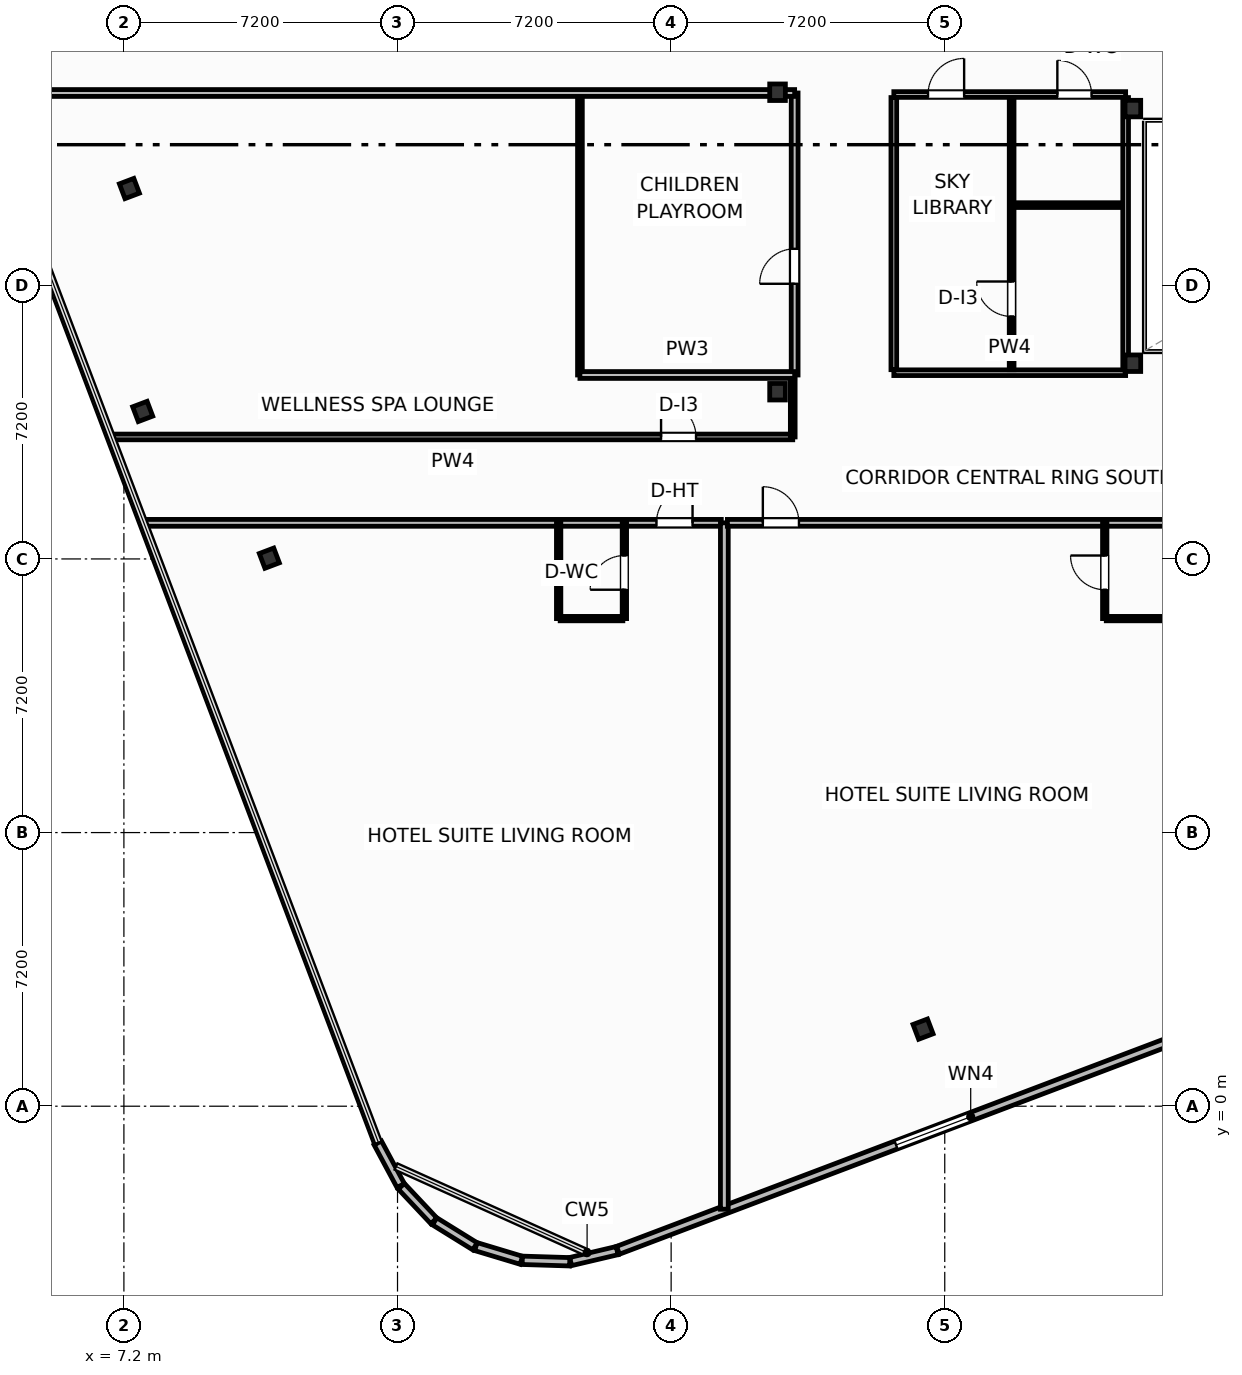
"""IFC4 building model, lengths in metres.
Left out: names, types, materials, properties, quantities, classifications, styles, units other than length and angle.
Written with IfcOpenShell. Run it as: python <this file> out.ifc"""

import sys

from ifc_helpers import new_model, si_unit, direction, frame, frame_2d, origin, origin_2d, place, context, subcontext, project, spatial, rectangle, i_section, extrude, element, fill, save


model = new_model("IFC4")
c1 = context("Model", 3, precision=1e-05, world=origin(), true_north=direction((0.0, 1.0)))
c2 = subcontext(c1, "Body", "Model", "MODEL_VIEW")
j1 = project(units=[si_unit("LENGTHUNIT", "METRE"), si_unit("PLANEANGLEUNIT", "RADIAN")], contexts=[c1])
p1 = place(None, origin())
s1 = spatial("IfcSite", under=j1, at=p1, CompositionType="ELEMENT")
p2 = place(p1, origin())
s2 = spatial("IfcBuilding", under=s1, at=p2, CompositionType="ELEMENT")
p3 = place(p2, frame((0.0, 0.0, 227.5)))
s3 = spatial("IfcBuildingStorey", under=s2, at=p3, CompositionType="ELEMENT", Elevation=227.5)
for number, where, z_axis, x_axis in (
    (1, (33.75, 19.55, 0.0), (0.0, 0.0, 1.0), (1.0, 0.0, 0.0)),
    (2, (33.75, 26.25, 0.0), (0.0, 0.0, 1.0), (1.0, 0.0, 0.0)),
    (3, (24.4, 18.8, 0.0), (0.0, 0.0, 1.0), (1.0, 0.0, 0.0)),
    (4, (24.4, 26.68, 0.0), (0.0, 0.0, 1.0), (1.0, 0.0, 0.0)),
):
    element("IfcColumn", number, at=place(p3, frame(where, z_axis=z_axis, x_axis=x_axis)), inside=s3, PredefinedType="COLUMN", context=c2, shape_type="SweptSolid", body=[
        extrude(i_section(OverallWidth=0.412, OverallDepth=0.435, WebThickness=0.036, FlangeThickness=0.057, FilletRadius=0.025, at=origin_2d()), origin(), (0.0, 0.0, 1.0), 3.7),
    ])
for number, where, z_axis, x_axis in (
    (5, (28.229, 2.028, 0.0), (0.0, 0.0, 1.0), (0.935, 0.354, 0.0)),
    (6, (7.345, 24.146, 0.0), (0.0, 0.0, 1.0), (0.935, 0.354, 0.0)),
    (7, (7.695, 18.281, 0.0), (0.0, 0.0, 1.0), (0.935, 0.354, 0.0)),
    (8, (11.027, 14.42, 0.0), (0.0, 0.0, 1.0), (0.935, 0.354, 0.0)),
):
    element("IfcColumn", number, at=place(p3, frame(where, z_axis=z_axis, x_axis=x_axis)), inside=s3, PredefinedType="COLUMN", context=c2, shape_type="SweptSolid", body=[
        extrude(i_section(OverallWidth=0.406, OverallDepth=0.416, WebThickness=0.03, FlangeThickness=0.048, FilletRadius=0.025, at=origin_2d()), origin(), (0.0, 0.0, 1.0), 3.7),
    ])
p4 = place(p3, frame((13.881, -0.966, 0.0), z_axis=(0.0, 0.0, 1.0), x_axis=(0.473242342135, -0.88093228208, 0.0)))
e9 = element("IfcWall", 9, at=p4, inside=s3, PredefinedType="SOLIDWALL", context=c2, shape_type="SweptSolid", body=[
    extrude(rectangle(XDim=1.274, YDim=0.22, at=frame_2d((0.637, 0.0))), origin(), (0.0, 0.0, 1.0), 2.73),
])
for number, where, z_axis, x_axis in (
    (10, (14.5, -2.106, 0.0), (0.0, 0.0, 1.0), (0.685, -0.729, 0.0)),
    (11, (15.377, -3.029, 0.0), (0.0, 0.0, 1.0), (0.85, -0.526, 0.0)),
    (12, (16.463, -3.694, 0.0), (0.0, 0.0, 1.0), (0.958, -0.288, 0.0)),
):
    element("IfcWall", number, at=place(p3, frame(where, z_axis=z_axis, x_axis=x_axis)), inside=s3, PredefinedType="SOLIDWALL", context=c2, shape_type="SweptSolid", body=[
        extrude(rectangle(XDim=1.249, YDim=0.22, at=frame_2d((0.624, 0.0))), origin(), (0.0, 0.0, 1.0), 2.73),
    ])
p5 = place(p3, frame((17.683, -4.055, 0.0), z_axis=(0.0, 0.0, 1.0), x_axis=(0.999522886512, -0.030886879732, 0.0)))
e13 = element("IfcWall", 13, at=p5, inside=s3, PredefinedType="SOLIDWALL", context=c2, shape_type="SweptSolid", body=[
    extrude(rectangle(XDim=1.249, YDim=0.22, at=frame_2d((0.625, 0.0))), origin(), (0.0, 0.0, 1.0), 2.73),
])
p6 = place(p3, frame((18.956, -4.087, 0.0), z_axis=(0.0, 0.0, 1.0), x_axis=(0.973463008152, 0.228844426981, 0.0)))
e14 = element("IfcWall", 14, at=p6, inside=s3, PredefinedType="SOLIDWALL", context=c2, shape_type="SweptSolid", body=[
    extrude(rectangle(XDim=1.257, YDim=0.22, at=frame_2d((0.628, 0.0))), origin(), (0.0, 0.0, 1.0), 2.73),
])
p7 = place(p3, frame((20.202, -3.791, 0.0), z_axis=(0.0, 0.0, 1.0), x_axis=(0.935225574232, 0.354052432984, 0.0)))
e15 = element("IfcWall", 15, at=p7, inside=s3, PredefinedType="SOLIDWALL", context=c2, shape_type="SweptSolid", body=[
    extrude(rectangle(XDim=17.747, YDim=0.22, at=frame_2d((8.874, 0.0))), origin(), (0.0, 0.0, 1.0), 2.73),
])
p8 = place(p7, frame((7.823, 0.0, 0.8)))
e16 = element("IfcOpeningElement", 16, at=p8, cuts=e15, PredefinedType="OPENING", context=c2, shape_type="SweptSolid", body=[
    extrude(rectangle(XDim=2.1, YDim=1.75, at=frame_2d((1.05, 0.875))), frame((0.0, 0.12, 0.0), z_axis=(0.0, -1.0, 0.0), x_axis=(1.0, 0.0, 0.0)), (0.0, 0.0, 1.0), 0.24),
])
p9 = place(p3, frame((6.908, 17.61, 0.0), z_axis=(0.0, 0.0, 1.0), x_axis=(1.0, 0.0, 0.0)))
e17 = element("IfcWall", 17, at=p9, inside=s3, PredefinedType="PARTITIONING", context=c2, shape_type="SweptSolid", body=[
    extrude(rectangle(XDim=17.892, YDim=0.15, at=frame_2d((8.946, 0.0))), origin(), (0.0, 0.0, 1.0), 3.45),
])
p10 = place(p9, frame((14.427, 0.0, 0.0)))
e18 = element("IfcOpeningElement", 18, at=p10, cuts=e17, PredefinedType="OPENING", context=c2, shape_type="SweptSolid", body=[
    extrude(rectangle(XDim=0.92, YDim=2.05, at=frame_2d((0.46, 1.025))), frame((0.0, 0.085, 0.0), z_axis=(0.0, -1.0, 0.0), x_axis=(1.0, 0.0, 0.0)), (0.0, 0.0, 1.0), 0.17),
])
p11 = place(p3, frame((24.8, 17.61, 0.0), z_axis=(0.0, 0.0, 1.0), x_axis=(0.0, 1.0, 0.0)))
e19 = element("IfcWall", 19, at=p11, inside=s3, PredefinedType="PARTITIONING", context=c2, shape_type="SweptSolid", body=[
    extrude(rectangle(XDim=1.63, YDim=0.125, at=frame_2d((0.815, 0.0))), origin(), (0.0, 0.0, 1.0), 2.739),
])
p12 = place(p3, frame((7.764, 15.35, 0.0), z_axis=(0.0, 0.0, 1.0), x_axis=(1.0, 0.0, 0.0)))
e20 = element("IfcWall", 20, at=p12, inside=s3, PredefinedType="PARTITIONING", context=c2, shape_type="SweptSolid", body=[
    extrude(rectangle(XDim=15.156, YDim=0.18, at=frame_2d((7.578, 0.0))), origin(), (0.0, 0.0, 1.0), 3.45),
])
p13 = place(p12, frame((13.45, 0.0, 0.0)))
e21 = element("IfcOpeningElement", 21, at=p13, cuts=e20, PredefinedType="OPENING", context=c2, shape_type="SweptSolid", body=[
    extrude(rectangle(XDim=0.95, YDim=2.15, at=frame_2d((0.475, 1.075))), frame((0.0, 0.1, 0.0), z_axis=(0.0, -1.0, 0.0), x_axis=(1.0, 0.0, 0.0)), (0.0, 0.0, 1.0), 0.2),
])
p14 = place(p3, frame((18.68, 12.83, 0.0), z_axis=(0.0, 0.0, 1.0), x_axis=(1.0, 0.0, 0.0)))
e22 = element("IfcWall", 22, at=p14, inside=s3, PredefinedType="PARTITIONING", context=c2, shape_type="SweptSolid", body=[
    extrude(rectangle(XDim=1.65, YDim=0.115, at=frame_2d((0.825, 0.0))), origin(), (0.0, 0.0, 1.0), 3.45),
])
p15 = place(p3, frame((20.37, 12.83, 0.0), z_axis=(0.0, 0.0, 1.0), x_axis=(0.0, 1.0, 0.0)))
e23 = element("IfcWall", 23, at=p15, inside=s3, PredefinedType="PARTITIONING", context=c2, shape_type="SweptSolid", body=[
    extrude(rectangle(XDim=2.52, YDim=0.115, at=frame_2d((1.26, 0.0))), origin(), (0.0, 0.0, 1.0), 3.45),
])
p16 = place(p15, frame((0.76, 0.0, 0.0)))
e24 = element("IfcOpeningElement", 24, at=p16, cuts=e23, PredefinedType="OPENING", context=c2, shape_type="SweptSolid", body=[
    extrude(rectangle(XDim=0.9, YDim=2.05, at=frame_2d((0.45, 1.025))), frame((0.0, 0.067, 0.0), z_axis=(0.0, -1.0, 0.0), x_axis=(1.0, 0.0, 0.0)), (0.0, 0.0, 1.0), 0.135),
])
p17 = place(p3, frame((18.64, 12.83, 0.0), z_axis=(0.0, 0.0, 1.0), x_axis=(0.0, 1.0, 0.0)))
e25 = element("IfcWall", 25, at=p17, inside=s3, PredefinedType="PARTITIONING", context=c2, shape_type="SweptSolid", body=[
    extrude(rectangle(XDim=2.52, YDim=0.115, at=frame_2d((1.26, 0.0))), origin(), (0.0, 0.0, 1.0), 3.45),
])
p18 = place(p3, frame((23.0, -2.71, 0.0), z_axis=(0.0, 0.0, 1.0), x_axis=(0.0, 1.0, 0.0)))
e26 = element("IfcWall", 26, at=p18, inside=s3, PredefinedType="PARTITIONING", context=c2, shape_type="SweptSolid", body=[
    extrude(rectangle(XDim=18.06, YDim=0.205, at=frame_2d((9.03, 0.0))), origin(), (0.0, 0.0, 1.0), 3.45),
])
p19 = place(p3, frame((23.08, 15.35, 0.0), z_axis=(0.0, 0.0, 1.0), x_axis=(1.0, 0.0, 0.0)))
e27 = element("IfcWall", 27, at=p19, inside=s3, PredefinedType="PARTITIONING", context=c2, shape_type="SweptSolid", body=[
    extrude(rectangle(XDim=12.34, YDim=0.18, at=frame_2d((6.17, 0.0))), origin(), (0.0, 0.0, 1.0), 3.45),
])
p20 = place(p19, frame((0.933, 0.0, 0.0)))
e28 = element("IfcOpeningElement", 28, at=p20, cuts=e27, PredefinedType="OPENING", context=c2, shape_type="SweptSolid", body=[
    extrude(rectangle(XDim=0.95, YDim=2.15, at=frame_2d((0.475, 1.075))), frame((0.0, 0.1, 0.0), z_axis=(0.0, -1.0, 0.0), x_axis=(1.0, 0.0, 0.0)), (0.0, 0.0, 1.0), 0.2),
])
p21 = place(p3, frame((33.05, 12.83, 0.0), z_axis=(0.0, 0.0, 1.0), x_axis=(1.0, 0.0, 0.0)))
e29 = element("IfcWall", 29, at=p21, inside=s3, PredefinedType="PARTITIONING", context=c2, shape_type="SweptSolid", body=[
    extrude(rectangle(XDim=2.15, YDim=0.115, at=frame_2d((1.075, 0.0))), origin(), (0.0, 0.0, 1.0), 3.45),
])
p22 = place(p3, frame((33.01, 12.83, 0.0), z_axis=(0.0, 0.0, 1.0), x_axis=(0.0, 1.0, 0.0)))
e30 = element("IfcWall", 30, at=p22, inside=s3, PredefinedType="PARTITIONING", context=c2, shape_type="SweptSolid", body=[
    extrude(rectangle(XDim=2.52, YDim=0.115, at=frame_2d((1.26, 0.0))), origin(), (0.0, 0.0, 1.0), 3.45),
])
p23 = place(p22, frame((0.76, 0.0, 0.0)))
e31 = element("IfcOpeningElement", 31, at=p23, cuts=e30, PredefinedType="OPENING", context=c2, shape_type="SweptSolid", body=[
    extrude(rectangle(XDim=0.9, YDim=2.05, at=frame_2d((0.45, 1.025))), frame((0.0, 0.067, 0.0), z_axis=(0.0, -1.0, 0.0), x_axis=(1.0, 0.0, 0.0)), (0.0, 0.0, 1.0), 0.135),
])
p24 = place(p3, frame((24.85, 19.24, 0.0), z_axis=(0.0, 0.0, 1.0), x_axis=(0.0, 1.0, 0.0)))
e32 = element("IfcWall", 32, at=p24, inside=s3, PredefinedType="PARTITIONING", context=c2, shape_type="SweptSolid", body=[
    extrude(rectangle(XDim=7.42, YDim=0.18, at=frame_2d((3.71, 0.0))), origin(), (0.0, 0.0, 1.0), 3.45),
])
p25 = place(p24, frame((2.4, 0.0, 0.0)))
e33 = element("IfcOpeningElement", 33, at=p25, cuts=e32, PredefinedType="OPENING", context=c2, shape_type="SweptSolid", body=[
    extrude(rectangle(XDim=0.92, YDim=2.05, at=frame_2d((0.46, 1.025))), frame((0.0, 0.1, 0.0), z_axis=(0.0, -1.0, 0.0), x_axis=(1.0, 0.0, 0.0)), (0.0, 0.0, 1.0), 0.2),
])
p26 = place(p3, frame((19.2, 19.24, 0.0), z_axis=(0.0, 0.0, 1.0), x_axis=(0.0, 1.0, 0.0)))
e34 = element("IfcWall", 34, at=p26, inside=s3, PredefinedType="PARTITIONING", context=c2, shape_type="SweptSolid", body=[
    extrude(rectangle(XDim=7.42, YDim=0.125, at=frame_2d((3.71, 0.0))), origin(), (0.0, 0.0, 1.0), 3.45),
])
p27 = place(p3, frame((19.2, 19.24, 0.0), z_axis=(0.0, 0.0, 1.0), x_axis=(1.0, 0.0, 0.0)))
e35 = element("IfcWall", 35, at=p27, inside=s3, PredefinedType="PARTITIONING", context=c2, shape_type="SweptSolid", body=[
    extrude(rectangle(XDim=5.65, YDim=0.18, at=frame_2d((2.825, 0.0))), origin(), (0.0, 0.0, 1.0), 3.45),
])
p28 = place(p3, frame((3.482, 26.66, 0.0), z_axis=(0.0, 0.0, 1.0), x_axis=(1.0, 0.0, 0.0)))
e36 = element("IfcWall", 36, at=p28, inside=s3, PredefinedType="PARTITIONING", context=c2, shape_type="SweptSolid", body=[
    extrude(rectangle(XDim=21.368, YDim=0.18, at=frame_2d((10.684, 0.0))), origin(), (0.0, 0.0, 1.0), 2.662),
])
p29 = place(p3, frame((27.46, 26.62, 0.0), z_axis=(0.0, 0.0, 1.0), x_axis=(1.0, 0.0, 0.0)))
e37 = element("IfcWall", 37, at=p29, inside=s3, PredefinedType="PARTITIONING", context=c2, shape_type="SweptSolid", body=[
    extrude(rectangle(XDim=6.1, YDim=0.15, at=frame_2d((3.05, 0.0))), origin(), (0.0, 0.0, 1.0), 2.662),
])
p30 = place(p29, frame((0.9, 0.0, 0.0)))
e38 = element("IfcOpeningElement", 38, at=p30, cuts=e37, PredefinedType="OPENING", context=c2, shape_type="SweptSolid", body=[
    extrude(rectangle(XDim=0.95, YDim=2.05, at=frame_2d((0.475, 1.025))), frame((0.0, 0.085, 0.0), z_axis=(0.0, -1.0, 0.0), x_axis=(1.0, 0.0, 0.0)), (0.0, 0.0, 1.0), 0.17),
])
p31 = place(p29, frame((4.303, 0.0, 0.0)))
e39 = element("IfcOpeningElement", 39, at=p31, cuts=e37, PredefinedType="OPENING", context=c2, shape_type="SweptSolid", body=[
    extrude(rectangle(XDim=0.9, YDim=2.05, at=frame_2d((0.45, 1.025))), frame((0.0, 0.085, 0.0), z_axis=(0.0, -1.0, 0.0), x_axis=(1.0, 0.0, 0.0)), (0.0, 0.0, 1.0), 0.17),
])
p32 = place(p3, frame((27.46, 19.3, 0.0), z_axis=(0.0, 0.0, 1.0), x_axis=(1.0, 0.0, 0.0)))
e40 = element("IfcWall", 40, at=p32, inside=s3, PredefinedType="PARTITIONING", context=c2, shape_type="SweptSolid", body=[
    extrude(rectangle(XDim=6.1, YDim=0.15, at=frame_2d((3.05, 0.0))), origin(), (0.0, 0.0, 1.0), 2.662),
])
p33 = place(p3, frame((30.56, 19.38, 0.0), z_axis=(0.0, 0.0, 1.0), x_axis=(0.0, 1.0, 0.0)))
e41 = element("IfcWall", 41, at=p33, inside=s3, PredefinedType="PARTITIONING", context=c2, shape_type="SweptSolid", body=[
    extrude(rectangle(XDim=7.16, YDim=0.125, at=frame_2d((3.58, 0.0))), origin(), (0.0, 0.0, 1.0), 3.45),
])
p34 = place(p33, frame((1.4, 0.0, 0.0)))
e42 = element("IfcOpeningElement", 42, at=p34, cuts=e41, PredefinedType="OPENING", context=c2, shape_type="SweptSolid", body=[
    extrude(rectangle(XDim=0.92, YDim=2.05, at=frame_2d((0.46, 1.025))), frame((0.0, 0.073, 0.0), z_axis=(0.0, -1.0, 0.0), x_axis=(1.0, 0.0, 0.0)), (0.0, 0.0, 1.0), 0.145),
])
p35 = place(p3, frame((30.64, 23.71, 0.0), z_axis=(0.0, 0.0, 1.0), x_axis=(1.0, 0.0, 0.0)))
e43 = element("IfcWall", 43, at=p35, inside=s3, PredefinedType="PARTITIONING", context=c2, shape_type="SweptSolid", body=[
    extrude(rectangle(XDim=2.88, YDim=0.125, at=frame_2d((1.44, 0.0))), origin(), (0.0, 0.0, 1.0), 3.45),
])
p36 = place(p3, frame((27.46, 19.38, 0.0), z_axis=(0.0, 0.0, 1.0), x_axis=(0.0, 1.0, 0.0)))
e44 = element("IfcWall", 44, at=p36, inside=s3, PredefinedType="PARTITIONING", context=c2, shape_type="SweptSolid", body=[
    extrude(rectangle(XDim=7.16, YDim=0.15, at=frame_2d((3.58, 0.0))), origin(), (0.0, 0.0, 1.0), 3.45),
])
p37 = place(p3, frame((33.56, 19.38, 0.0), z_axis=(0.0, 0.0, 1.0), x_axis=(0.0, 1.0, 0.0)))
e45 = element("IfcWall", 45, at=p37, inside=s3, PredefinedType="PARTITIONING", context=c2, shape_type="SweptSolid", body=[
    extrude(rectangle(XDim=7.16, YDim=0.15, at=frame_2d((3.58, 0.0))), origin(), (0.0, 0.0, 1.0), 2.824),
])
p38 = place(p8, origin())
e46 = element("IfcWindow", 46, at=p38, inside=s3, PartitioningType="SINGLE_PANEL", PredefinedType="WINDOW", context=c2, shape_type="SweptSolid", body=[
    extrude(rectangle(XDim=2.1, YDim=1.75, at=frame_2d((1.05, 0.875))), frame((0.0, 0.03, 0.0), z_axis=(0.0, -1.0, 0.0), x_axis=(1.0, 0.0, 0.0)), (0.0, 0.0, 1.0), 0.06),
])
fill(e16, e46)
p39 = place(p10, origin())
e47 = element("IfcDoor", 47, at=p39, inside=s3, OperationType="SINGLE_SWING_LEFT", PredefinedType="DOOR", context=c2, shape_type="SweptSolid", body=[
    extrude(rectangle(XDim=0.92, YDim=2.05, at=frame_2d((0.46, 1.025))), frame((0.0, 0.025, 0.0), z_axis=(0.0, -1.0, 0.0), x_axis=(1.0, 0.0, 0.0)), (0.0, 0.0, 1.0), 0.05),
])
fill(e18, e47)
p40 = place(p13, origin())
e48 = element("IfcDoor", 48, at=p40, inside=s3, OperationType="SINGLE_SWING_RIGHT", PredefinedType="DOOR", context=c2, shape_type="SweptSolid", body=[
    extrude(rectangle(XDim=0.95, YDim=2.15, at=frame_2d((0.475, 1.075))), frame((0.0, 0.025, 0.0), z_axis=(0.0, -1.0, 0.0), x_axis=(1.0, 0.0, 0.0)), (0.0, 0.0, 1.0), 0.05),
])
fill(e21, e48)
p41 = place(p16, origin())
e49 = element("IfcDoor", 49, at=p41, inside=s3, OperationType="SINGLE_SWING_LEFT", PredefinedType="DOOR", context=c2, shape_type="SweptSolid", body=[
    extrude(rectangle(XDim=0.9, YDim=2.05, at=frame_2d((0.45, 1.025))), frame((0.0, 0.025, 0.0), z_axis=(0.0, -1.0, 0.0), x_axis=(1.0, 0.0, 0.0)), (0.0, 0.0, 1.0), 0.05),
])
fill(e24, e49)
p42 = place(p20, origin())
e50 = element("IfcDoor", 50, at=p42, inside=s3, OperationType="SINGLE_SWING_LEFT", PredefinedType="DOOR", context=c2, shape_type="SweptSolid", body=[
    extrude(rectangle(XDim=0.95, YDim=2.15, at=frame_2d((0.475, 1.075))), frame((0.0, 0.025, 0.0), z_axis=(0.0, -1.0, 0.0), x_axis=(1.0, 0.0, 0.0)), (0.0, 0.0, 1.0), 0.05),
])
fill(e28, e50)
p43 = place(p23, origin())
e51 = element("IfcDoor", 51, at=p43, inside=s3, OperationType="SINGLE_SWING_RIGHT", PredefinedType="DOOR", context=c2, shape_type="SweptSolid", body=[
    extrude(rectangle(XDim=0.9, YDim=2.05, at=frame_2d((0.45, 1.025))), frame((0.0, 0.025, 0.0), z_axis=(0.0, -1.0, 0.0), x_axis=(1.0, 0.0, 0.0)), (0.0, 0.0, 1.0), 0.05),
])
fill(e31, e51)
p44 = place(p25, origin())
e52 = element("IfcDoor", 52, at=p44, inside=s3, OperationType="SINGLE_SWING_LEFT", PredefinedType="DOOR", context=c2, shape_type="SweptSolid", body=[
    extrude(rectangle(XDim=0.92, YDim=2.05, at=frame_2d((0.46, 1.025))), frame((0.0, 0.025, 0.0), z_axis=(0.0, -1.0, 0.0), x_axis=(1.0, 0.0, 0.0)), (0.0, 0.0, 1.0), 0.05),
])
fill(e33, e52)
p45 = place(p30, origin())
e53 = element("IfcDoor", 53, at=p45, inside=s3, OperationType="SINGLE_SWING_RIGHT", PredefinedType="DOOR", context=c2, shape_type="SweptSolid", body=[
    extrude(rectangle(XDim=0.95, YDim=2.05, at=frame_2d((0.475, 1.025))), frame((0.0, 0.025, 0.0), z_axis=(0.0, -1.0, 0.0), x_axis=(1.0, 0.0, 0.0)), (0.0, 0.0, 1.0), 0.05),
])
fill(e38, e53)
p46 = place(p31, origin())
e54 = element("IfcDoor", 54, at=p46, inside=s3, OperationType="SINGLE_SWING_LEFT", PredefinedType="DOOR", context=c2, shape_type="SweptSolid", body=[
    extrude(rectangle(XDim=0.9, YDim=2.05, at=frame_2d((0.45, 1.025))), frame((0.0, 0.025, 0.0), z_axis=(0.0, -1.0, 0.0), x_axis=(1.0, 0.0, 0.0)), (0.0, 0.0, 1.0), 0.05),
])
fill(e39, e54)
p47 = place(p34, origin())
e55 = element("IfcDoor", 55, at=p47, inside=s3, OperationType="SINGLE_SWING_RIGHT", PredefinedType="DOOR", context=c2, shape_type="SweptSolid", body=[
    extrude(rectangle(XDim=0.92, YDim=2.05, at=frame_2d((0.46, 1.025))), frame((0.0, 0.025, 0.0), z_axis=(0.0, -1.0, 0.0), x_axis=(1.0, 0.0, 0.0)), (0.0, 0.0, 1.0), 0.05),
])
fill(e42, e55)
save(model, sys.argv[1])
